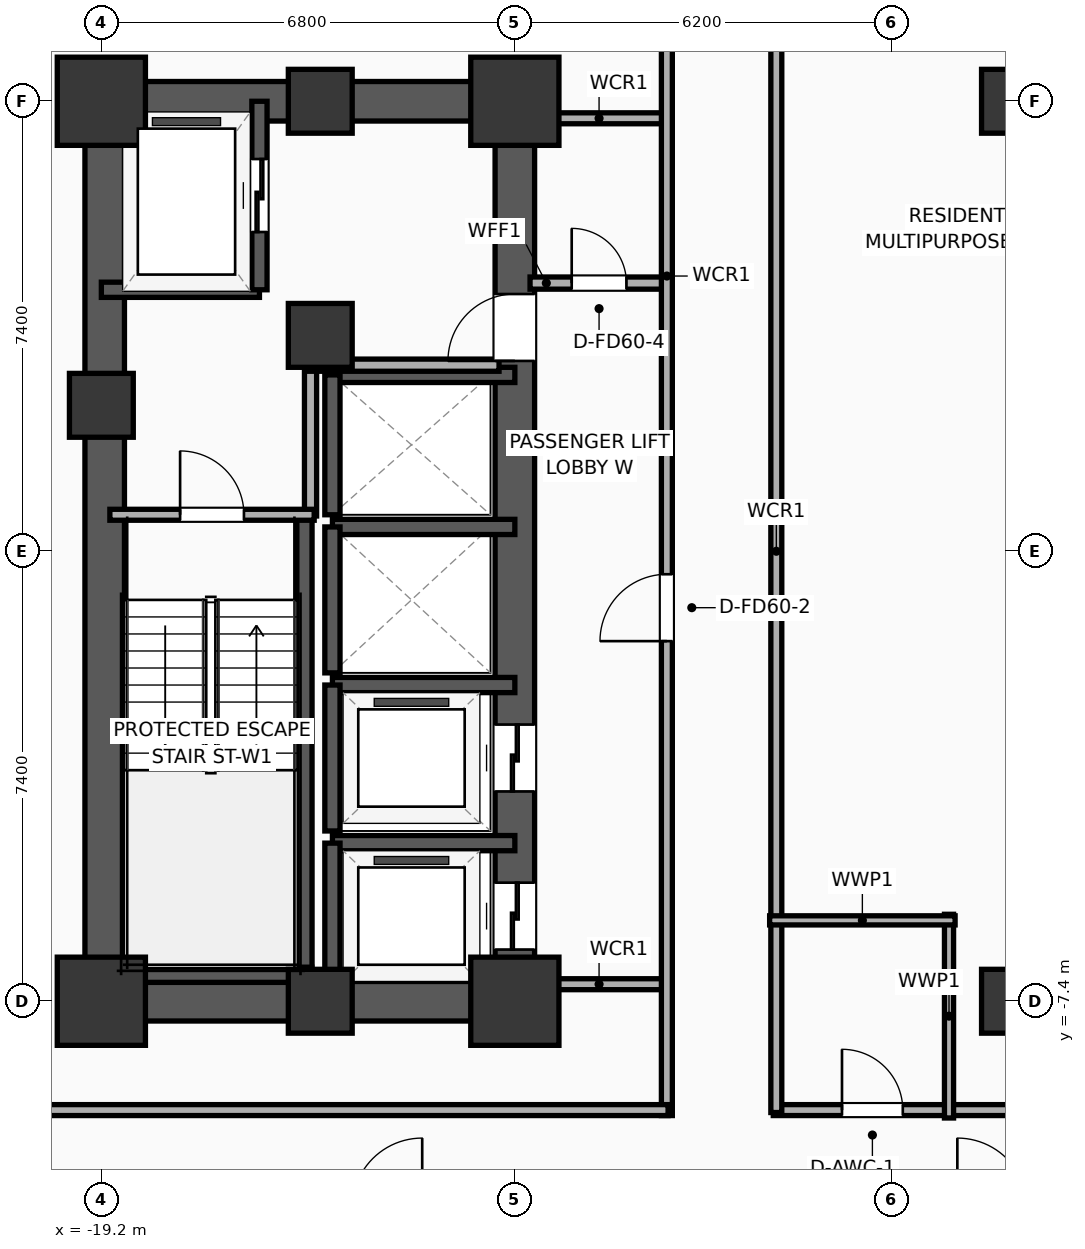
"""IFC4 building model, lengths in metres.
Left out: names, types, materials, properties, quantities, classifications, styles, units other than length and angle.
Written with IfcOpenShell. Run it as: python <this file> out.ifc"""

import sys

from ifc_helpers import new_model, si_unit, direction, frame, frame_2d, origin, origin_2d, place, context, subcontext, project, spatial, rectangle, extrude, element, fill, save


model = new_model("IFC4")
c1 = context("Model", 3, precision=1e-05, world=origin(), true_north=direction((0.0, 1.0)))
c2 = subcontext(c1, "Body", "Model", "MODEL_VIEW")
j1 = project(units=[si_unit("LENGTHUNIT", "METRE"), si_unit("PLANEANGLEUNIT", "RADIAN")], contexts=[c1])
p1 = place(None, origin())
s1 = spatial("IfcSite", under=j1, at=p1, CompositionType="ELEMENT")
p2 = place(p1, origin())
s2 = spatial("IfcBuilding", under=s1, at=p2, CompositionType="ELEMENT")
p3 = place(p2, frame((0.0, 0.0, 53.3)))
s3 = spatial("IfcBuildingStorey", under=s2, at=p3, CompositionType="ELEMENT", Elevation=53.3)
p4 = place(p3, frame((-19.2, -7.4, 0.0), z_axis=(0.0, 0.0, 1.0), x_axis=(1.0, 0.0, 0.0)))
e1 = element("IfcColumn", 1, at=p4, inside=s3, PredefinedType="COLUMN", context=c2, shape_type="SweptSolid", body=[
    extrude(rectangle(XDim=1.45, YDim=1.45, at=origin_2d()), origin(), (0.0, 0.0, 1.0), 3.9),
])
p5 = place(p3, frame((-19.2, 2.4, 0.0), z_axis=(0.0, 0.0, 1.0), x_axis=(1.0, 0.0, 0.0)))
e2 = element("IfcColumn", 2, at=p5, inside=s3, PredefinedType="COLUMN", context=c2, shape_type="SweptSolid", body=[
    extrude(rectangle(XDim=1.05, YDim=1.05, at=origin_2d()), origin(), (0.0, 0.0, 1.0), 3.9),
])
p6 = place(p3, frame((-19.2, 7.4, 0.0), z_axis=(0.0, 0.0, 1.0), x_axis=(1.0, 0.0, 0.0)))
e3 = element("IfcColumn", 3, at=p6, inside=s3, PredefinedType="COLUMN", context=c2, shape_type="SweptSolid", body=[
    extrude(rectangle(XDim=1.45, YDim=1.45, at=origin_2d()), origin(), (0.0, 0.0, 1.0), 3.9),
])
for number, where, z_axis, x_axis in (
    (4, (-15.6, -7.4, 0.0), (0.0, 0.0, 1.0), (1.0, 0.0, 0.0)),
    (5, (-15.6, 7.4, 0.0), (0.0, 0.0, 1.0), (1.0, 0.0, 0.0)),
):
    element("IfcColumn", number, at=place(p3, frame(where, z_axis=z_axis, x_axis=x_axis)), inside=s3, PredefinedType="COLUMN", context=c2, shape_type="SweptSolid", body=[
        extrude(rectangle(XDim=1.05, YDim=1.05, at=origin_2d()), origin(), (0.0, 0.0, 1.0), 3.9),
    ])
p7 = place(p3, frame((-12.4, -7.4, 0.0), z_axis=(0.0, 0.0, 1.0), x_axis=(1.0, 0.0, 0.0)))
e6 = element("IfcColumn", 6, at=p7, inside=s3, PredefinedType="COLUMN", context=c2, shape_type="SweptSolid", body=[
    extrude(rectangle(XDim=1.45, YDim=1.45, at=origin_2d()), origin(), (0.0, 0.0, 1.0), 3.9),
])
p8 = place(p3, frame((-15.6, 3.55, 0.0), z_axis=(0.0, 0.0, 1.0), x_axis=(1.0, 0.0, 0.0)))
e7 = element("IfcColumn", 7, at=p8, inside=s3, PredefinedType="COLUMN", context=c2, shape_type="SweptSolid", body=[
    extrude(rectangle(XDim=1.05, YDim=1.05, at=origin_2d()), origin(), (0.0, 0.0, 1.0), 3.9),
])
p9 = place(p3, frame((-12.4, 7.4, 0.0), z_axis=(0.0, 0.0, 1.0), x_axis=(1.0, 0.0, 0.0)))
e8 = element("IfcColumn", 8, at=p9, inside=s3, PredefinedType="COLUMN", context=c2, shape_type="SweptSolid", body=[
    extrude(rectangle(XDim=1.45, YDim=1.45, at=origin_2d()), origin(), (0.0, 0.0, 1.0), 3.9),
])
for number, where, z_axis, x_axis in (
    (9, (-19.525, -7.4, 0.0), (0.0, 0.0, 1.0), (1.0, 0.0, 0.0)),
    (10, (-19.525, 7.4, 0.0), (0.0, 0.0, 1.0), (1.0, 0.0, 0.0)),
):
    element("IfcWall", number, at=place(p3, frame(where, z_axis=z_axis, x_axis=x_axis)), inside=s3, PredefinedType="SHEAR", context=c2, shape_type="SweptSolid", body=[
        extrude(rectangle(XDim=7.45, YDim=0.65, at=frame_2d((3.725, 0.0))), origin(), (0.0, 0.0, 1.0), 3.65),
    ])
p10 = place(p3, frame((-19.145, -7.4, 0.0), z_axis=(0.0, 0.0, 1.0), x_axis=(0.0, 1.0, 0.0)))
e11 = element("IfcWall", 11, at=p10, inside=s3, PredefinedType="SHEAR", context=c2, shape_type="SweptSolid", body=[
    extrude(rectangle(XDim=14.8, YDim=0.65, at=frame_2d((7.4, 0.0))), origin(), (0.0, 0.0, 1.0), 3.65),
])
p11 = place(p3, frame((-12.4, -7.4, 0.0), z_axis=(0.0, 0.0, 1.0), x_axis=(0.0, 1.0, 0.0)))
e12 = element("IfcWall", 12, at=p11, inside=s3, PredefinedType="SHEAR", context=c2, shape_type="SweptSolid", body=[
    extrude(rectangle(XDim=14.8, YDim=0.65, at=frame_2d((7.4, 0.0))), origin(), (0.0, 0.0, 1.0), 3.65),
])
p12 = place(p11, frame((0.85, 0.0, 0.0)))
e13 = element("IfcOpeningElement", 13, at=p12, cuts=e12, PredefinedType="OPENING", context=c2, shape_type="SweptSolid", body=[
    extrude(rectangle(XDim=1.1, YDim=2.05, at=frame_2d((0.55, 1.025))), frame((0.0, 0.335, 0.0), z_axis=(0.0, -1.0, 0.0), x_axis=(1.0, 0.0, 0.0)), (0.0, 0.0, 1.0), 0.67),
])
p13 = place(p11, frame((3.45, 0.0, 0.0)))
e14 = element("IfcOpeningElement", 14, at=p13, cuts=e12, PredefinedType="OPENING", context=c2, shape_type="SweptSolid", body=[
    extrude(rectangle(XDim=1.1, YDim=2.05, at=frame_2d((0.55, 1.025))), frame((0.0, 0.335, 0.0), z_axis=(0.0, -1.0, 0.0), x_axis=(1.0, 0.0, 0.0)), (0.0, 0.0, 1.0), 0.67),
])
p14 = place(p11, frame((10.53, 0.0, 0.0)))
e15 = element("IfcOpeningElement", 15, at=p14, cuts=e12, PredefinedType="OPENING", context=c2, shape_type="SweptSolid", body=[
    extrude(rectangle(XDim=1.1, YDim=2.05, at=frame_2d((0.55, 1.025))), frame((0.0, 0.335, 0.0), z_axis=(0.0, -1.0, 0.0), x_axis=(1.0, 0.0, 0.0)), (0.0, 0.0, 1.0), 0.67),
])
p15 = place(p3, frame((-15.86, -7.085, 0.0), z_axis=(0.0, 0.0, 1.0), x_axis=(0.0, 1.0, 0.0)))
e16 = element("IfcWall", 16, at=p15, inside=s3, PredefinedType="SOLIDWALL", context=c2, shape_type="SweptSolid", body=[
    extrude(rectangle(XDim=7.685, YDim=0.25, at=frame_2d((3.843, 0.0))), origin(), (0.0, 0.0, 1.0), 3.65),
])
p16 = place(p3, frame((-19.2, -6.965, 0.0), z_axis=(0.0, 0.0, 1.0), x_axis=(1.0, 0.0, 0.0)))
e17 = element("IfcWall", 17, at=p16, inside=s3, PredefinedType="SOLIDWALL", context=c2, shape_type="SweptSolid", body=[
    extrude(rectangle(XDim=3.46, YDim=0.25, at=frame_2d((1.73, 0.0))), origin(), (0.0, 0.0, 1.0), 3.65),
])
for number, where, z_axis, x_axis in (
    (18, (-4.2, -7.4, 0.0), (0.0, 0.0, 1.0), (1.0, 0.0, 0.0)),
    (19, (-4.2, 7.4, 0.0), (0.0, 0.0, 1.0), (1.0, 0.0, 0.0)),
):
    element("IfcColumn", number, at=place(p3, frame(where, z_axis=z_axis, x_axis=x_axis)), inside=s3, PredefinedType="COLUMN", context=c2, shape_type="SweptSolid", body=[
        extrude(rectangle(XDim=1.05, YDim=1.05, at=origin_2d()), origin(), (0.0, 0.0, 1.0), 3.9),
    ])
p17 = place(p3, frame((-19.2, 4.3, 0.0), z_axis=(0.0, 0.0, 1.0), x_axis=(1.0, 0.0, 0.0)))
e20 = element("IfcWall", 20, at=p17, inside=s3, PredefinedType="SOLIDWALL", context=c2, shape_type="SweptSolid", body=[
    extrude(rectangle(XDim=2.6, YDim=0.25, at=frame_2d((1.3, 0.0))), origin(), (0.0, 0.0, 1.0), 3.65),
])
p18 = place(p3, frame((-16.6, 4.3, 0.0), z_axis=(0.0, 0.0, 1.0), x_axis=(0.0, 1.0, 0.0)))
e21 = element("IfcWall", 21, at=p18, inside=s3, PredefinedType="SOLIDWALL", context=c2, shape_type="SweptSolid", body=[
    extrude(rectangle(XDim=3.1, YDim=0.25, at=frame_2d((1.55, 0.0))), origin(), (0.0, 0.0, 1.0), 3.65),
])
p19 = place(p18, frame((0.95, 0.0, 0.0)))
e22 = element("IfcOpeningElement", 22, at=p19, cuts=e21, PredefinedType="OPENING", context=c2, shape_type="SweptSolid", body=[
    extrude(rectangle(XDim=1.2, YDim=2.05, at=frame_2d((0.6, 1.025))), frame((0.0, 0.135, 0.0), z_axis=(0.0, -1.0, 0.0), x_axis=(1.0, 0.0, 0.0)), (0.0, 0.0, 1.0), 0.27),
])
p20 = place(p3, frame((-12.4, -4.8, 0.0), z_axis=(0.0, 0.0, 1.0), x_axis=(-1.0, 0.0, 0.0)))
e23 = element("IfcWall", 23, at=p20, inside=s3, PredefinedType="SOLIDWALL", context=c2, shape_type="SweptSolid", body=[
    extrude(rectangle(XDim=3.0, YDim=0.25, at=frame_2d((1.5, 0.0))), origin(), (0.0, 0.0, 1.0), 3.65),
])
p21 = place(p3, frame((-15.4, -4.8, 0.0), z_axis=(0.0, 0.0, 1.0), x_axis=(0.0, -1.0, 0.0)))
e24 = element("IfcWall", 24, at=p21, inside=s3, PredefinedType="SOLIDWALL", context=c2, shape_type="SweptSolid", body=[
    extrude(rectangle(XDim=2.6, YDim=0.25, at=frame_2d((1.3, 0.0))), origin(), (0.0, 0.0, 1.0), 3.65),
])
p22 = place(p3, frame((-12.4, -2.2, 0.0), z_axis=(0.0, 0.0, 1.0), x_axis=(-1.0, 0.0, 0.0)))
e25 = element("IfcWall", 25, at=p22, inside=s3, PredefinedType="SOLIDWALL", context=c2, shape_type="SweptSolid", body=[
    extrude(rectangle(XDim=3.0, YDim=0.25, at=frame_2d((1.5, 0.0))), origin(), (0.0, 0.0, 1.0), 3.65),
])
p23 = place(p3, frame((-15.4, -2.2, 0.0), z_axis=(0.0, 0.0, 1.0), x_axis=(0.0, -1.0, 0.0)))
e26 = element("IfcWall", 26, at=p23, inside=s3, PredefinedType="SOLIDWALL", context=c2, shape_type="SweptSolid", body=[
    extrude(rectangle(XDim=2.4, YDim=0.25, at=frame_2d((1.2, 0.0))), origin(), (0.0, 0.0, 1.0), 3.65),
])
p24 = place(p3, frame((-12.4, 0.4, 0.0), z_axis=(0.0, 0.0, 1.0), x_axis=(-1.0, 0.0, 0.0)))
e27 = element("IfcWall", 27, at=p24, inside=s3, PredefinedType="SOLIDWALL", context=c2, shape_type="SweptSolid", body=[
    extrude(rectangle(XDim=3.0, YDim=0.25, at=frame_2d((1.5, 0.0))), origin(), (0.0, 0.0, 1.0), 3.65),
])
p25 = place(p3, frame((-15.4, 0.4, 0.0), z_axis=(0.0, 0.0, 1.0), x_axis=(0.0, -1.0, 0.0)))
e28 = element("IfcWall", 28, at=p25, inside=s3, PredefinedType="SOLIDWALL", context=c2, shape_type="SweptSolid", body=[
    extrude(rectangle(XDim=2.4, YDim=0.25, at=frame_2d((1.2, 0.0))), origin(), (0.0, 0.0, 1.0), 3.65),
])
p26 = place(p3, frame((-12.4, 2.9, 0.0), z_axis=(0.0, 0.0, 1.0), x_axis=(-1.0, 0.0, 0.0)))
e29 = element("IfcWall", 29, at=p26, inside=s3, PredefinedType="SOLIDWALL", context=c2, shape_type="SweptSolid", body=[
    extrude(rectangle(XDim=3.0, YDim=0.25, at=frame_2d((1.5, 0.0))), origin(), (0.0, 0.0, 1.0), 3.65),
])
p27 = place(p3, frame((-15.4, 2.9, 0.0), z_axis=(0.0, 0.0, 1.0), x_axis=(0.0, -1.0, 0.0)))
e30 = element("IfcWall", 30, at=p27, inside=s3, PredefinedType="SOLIDWALL", context=c2, shape_type="SweptSolid", body=[
    extrude(rectangle(XDim=2.3, YDim=0.25, at=frame_2d((1.15, 0.0))), origin(), (0.0, 0.0, 1.0), 3.65),
])
p28 = place(p3, frame((-15.76, 0.58, 0.0), z_axis=(0.0, 0.0, 1.0), x_axis=(0.0, 1.0, 0.0)))
e31 = element("IfcWall", 31, at=p28, inside=s3, PredefinedType="PARTITIONING", context=c2, shape_type="SweptSolid", body=[
    extrude(rectangle(XDim=2.52, YDim=0.2, at=frame_2d((1.26, 0.0))), origin(), (0.0, 0.0, 1.0), 3.65),
])
p29 = place(p3, frame((-15.82, 3.06, 0.0), z_axis=(0.0, 0.0, 1.0), x_axis=(1.0, 0.0, 0.0)))
e32 = element("IfcWall", 32, at=p29, inside=s3, PredefinedType="PARTITIONING", context=c2, shape_type="SweptSolid", body=[
    extrude(rectangle(XDim=3.16, YDim=0.2, at=frame_2d((1.58, 0.0))), origin(), (0.0, 0.0, 1.0), 3.65),
])
p30 = place(p3, frame((-19.06, 0.6, 0.0), z_axis=(0.0, 0.0, 1.0), x_axis=(1.0, 0.0, 0.0)))
e33 = element("IfcWall", 33, at=p30, inside=s3, PredefinedType="PARTITIONING", context=c2, shape_type="SweptSolid", body=[
    extrude(rectangle(XDim=3.36, YDim=0.18, at=frame_2d((1.68, 0.0))), origin(), (0.0, 0.0, 1.0), 3.65),
])
p31 = place(p30, frame((1.155, 0.0, 0.0)))
e34 = element("IfcOpeningElement", 34, at=p31, cuts=e33, PredefinedType="OPENING", context=c2, shape_type="SweptSolid", body=[
    extrude(rectangle(XDim=1.05, YDim=2.05, at=frame_2d((0.525, 1.025))), frame((0.0, 0.1, 0.0), z_axis=(0.0, -1.0, 0.0), x_axis=(1.0, 0.0, 0.0)), (0.0, 0.0, 1.0), 0.2),
])
p32 = place(p3, frame((-12.15, 4.41, 0.0), z_axis=(0.0, 0.0, 1.0), x_axis=(1.0, 0.0, 0.0)))
e35 = element("IfcWall", 35, at=p32, inside=s3, PredefinedType="PARTITIONING", context=c2, shape_type="SweptSolid", body=[
    extrude(rectangle(XDim=2.27, YDim=0.2, at=frame_2d((1.135, 0.0))), origin(), (0.0, 0.0, 1.0), 3.65),
])
p33 = place(p32, frame((0.685, 0.0, 0.0)))
e36 = element("IfcOpeningElement", 36, at=p33, cuts=e35, PredefinedType="OPENING", context=c2, shape_type="SweptSolid", body=[
    extrude(rectangle(XDim=0.9, YDim=2.05, at=frame_2d((0.45, 1.025))), frame((0.0, 0.11, 0.0), z_axis=(0.0, -1.0, 0.0), x_axis=(1.0, 0.0, 0.0)), (0.0, 0.0, 1.0), 0.22),
])
for number, where, z_axis, x_axis in (
    (37, (-12.15, 7.12, 0.0), (0.0, 0.0, 1.0), (1.0, 0.0, 0.0)),
    (38, (-12.15, -7.12, 0.0), (0.0, 0.0, 1.0), (1.0, 0.0, 0.0)),
):
    element("IfcWall", number, at=place(p3, frame(where, z_axis=z_axis, x_axis=x_axis)), inside=s3, PredefinedType="PARTITIONING", context=c2, shape_type="SweptSolid", body=[
        extrude(rectangle(XDim=2.27, YDim=0.18, at=frame_2d((1.135, 0.0))), origin(), (0.0, 0.0, 1.0), 2.94),
    ])
p34 = place(p3, frame((-9.9, -9.28, 0.0), z_axis=(0.0, 0.0, 1.0), x_axis=(0.0, 1.0, 0.0)))
e39 = element("IfcWall", 39, at=p34, inside=s3, PredefinedType="PARTITIONING", context=c2, shape_type="SweptSolid", body=[
    extrude(rectangle(XDim=18.56, YDim=0.18, at=frame_2d((9.28, 0.0))), origin(), (0.0, 0.0, 1.0), 3.65),
])
p35 = place(p34, frame((7.802, 0.0, 0.0)))
e40 = element("IfcOpeningElement", 40, at=p35, cuts=e39, PredefinedType="OPENING", context=c2, shape_type="SweptSolid", body=[
    extrude(rectangle(XDim=1.1, YDim=2.05, at=frame_2d((0.55, 1.025))), frame((0.0, 0.1, 0.0), z_axis=(0.0, -1.0, 0.0), x_axis=(1.0, 0.0, 0.0)), (0.0, 0.0, 1.0), 0.2),
])
p36 = place(p3, frame((-33.41, -9.19, 0.0), z_axis=(0.0, 0.0, 1.0), x_axis=(1.0, 0.0, 0.0)))
e41 = element("IfcWall", 41, at=p36, inside=s3, PredefinedType="PARTITIONING", context=c2, shape_type="SweptSolid", body=[
    extrude(rectangle(XDim=23.53, YDim=0.18, at=frame_2d((11.765, 0.0))), origin(), (0.0, 0.0, 1.0), 3.65),
])
p37 = place(p3, frame((-8.15, -9.19, 0.0), z_axis=(0.0, 0.0, 1.0), x_axis=(1.0, 0.0, 0.0)))
e42 = element("IfcWall", 42, at=p37, inside=s3, PredefinedType="PARTITIONING", context=c2, shape_type="SweptSolid", body=[
    extrude(rectangle(XDim=16.3, YDim=0.18, at=frame_2d((8.15, 0.0))), origin(), (0.0, 0.0, 1.0), 3.65),
])
p38 = place(p37, frame((1.13, 0.0, 0.0)))
e43 = element("IfcOpeningElement", 43, at=p38, cuts=e42, PredefinedType="OPENING", context=c2, shape_type="SweptSolid", body=[
    extrude(rectangle(XDim=1.0, YDim=2.05, at=frame_2d((0.5, 1.025))), frame((0.0, 0.1, 0.0), z_axis=(0.0, -1.0, 0.0), x_axis=(1.0, 0.0, 0.0)), (0.0, 0.0, 1.0), 0.2),
])
p39 = place(p37, frame((10.12, 0.0, 0.0)))
e44 = element("IfcOpeningElement", 44, at=p39, cuts=e42, PredefinedType="OPENING", context=c2, shape_type="SweptSolid", body=[
    extrude(rectangle(XDim=0.95, YDim=2.05, at=frame_2d((0.475, 1.025))), frame((0.0, 0.1, 0.0), z_axis=(0.0, -1.0, 0.0), x_axis=(1.0, 0.0, 0.0)), (0.0, 0.0, 1.0), 0.2),
])
p40 = place(p3, frame((-8.1, -9.23, 0.0), z_axis=(0.0, 0.0, 1.0), x_axis=(0.0, 1.0, 0.0)))
e45 = element("IfcWall", 45, at=p40, inside=s3, PredefinedType="PARTITIONING", context=c2, shape_type="SweptSolid", body=[
    extrude(rectangle(XDim=18.46, YDim=0.18, at=frame_2d((9.23, 0.0))), origin(), (0.0, 0.0, 1.0), 3.65),
])
p41 = place(p3, frame((-5.26, -9.32, 0.0), z_axis=(0.0, 0.0, 1.0), x_axis=(0.0, 1.0, 0.0)))
e46 = element("IfcWall", 46, at=p41, inside=s3, PredefinedType="PLUMBINGWALL", context=c2, shape_type="SweptSolid", body=[
    extrude(rectangle(XDim=3.35, YDim=0.15, at=frame_2d((1.675, 0.0))), origin(), (0.0, 0.0, 1.0), 3.65),
])
p42 = place(p3, frame((-8.21, -6.07, 0.0), z_axis=(0.0, 0.0, 1.0), x_axis=(1.0, 0.0, 0.0)))
e47 = element("IfcWall", 47, at=p42, inside=s3, PredefinedType="PLUMBINGWALL", context=c2, shape_type="SweptSolid", body=[
    extrude(rectangle(XDim=3.05, YDim=0.15, at=frame_2d((1.525, 0.0))), origin(), (0.0, 0.0, 1.0), 3.65),
])
p43 = place(p19, origin())
e48 = element("IfcDoor", 48, at=p43, inside=s3, OperationType="SLIDING_TO_LEFT", PredefinedType="DOOR", context=c2, shape_type="SweptSolid", body=[
    extrude(rectangle(XDim=1.2, YDim=2.05, at=frame_2d((0.6, 1.025))), frame((0.0, 0.025, 0.0), z_axis=(0.0, -1.0, 0.0), x_axis=(1.0, 0.0, 0.0)), (0.0, 0.0, 1.0), 0.05),
])
fill(e22, e48)
p44 = place(p12, origin())
e49 = element("IfcDoor", 49, at=p44, inside=s3, OperationType="SLIDING_TO_LEFT", PredefinedType="DOOR", context=c2, shape_type="SweptSolid", body=[
    extrude(rectangle(XDim=1.1, YDim=2.05, at=frame_2d((0.55, 1.025))), frame((0.0, 0.025, 0.0), z_axis=(0.0, -1.0, 0.0), x_axis=(1.0, 0.0, 0.0)), (0.0, 0.0, 1.0), 0.05),
])
fill(e13, e49)
p45 = place(p13, origin())
e50 = element("IfcDoor", 50, at=p45, inside=s3, OperationType="SLIDING_TO_LEFT", PredefinedType="DOOR", context=c2, shape_type="SweptSolid", body=[
    extrude(rectangle(XDim=1.1, YDim=2.05, at=frame_2d((0.55, 1.025))), frame((0.0, 0.025, 0.0), z_axis=(0.0, -1.0, 0.0), x_axis=(1.0, 0.0, 0.0)), (0.0, 0.0, 1.0), 0.05),
])
fill(e14, e50)
p46 = place(p31, origin())
e51 = element("IfcDoor", 51, at=p46, inside=s3, OperationType="SINGLE_SWING_LEFT", PredefinedType="DOOR", context=c2, shape_type="SweptSolid", body=[
    extrude(rectangle(XDim=1.05, YDim=2.05, at=frame_2d((0.525, 1.025))), frame((0.0, 0.025, 0.0), z_axis=(0.0, -1.0, 0.0), x_axis=(1.0, 0.0, 0.0)), (0.0, 0.0, 1.0), 0.05),
])
fill(e34, e51)
p47 = place(p33, origin())
e52 = element("IfcDoor", 52, at=p47, inside=s3, OperationType="SINGLE_SWING_LEFT", PredefinedType="DOOR", context=c2, shape_type="SweptSolid", body=[
    extrude(rectangle(XDim=0.9, YDim=2.05, at=frame_2d((0.45, 1.025))), frame((0.0, 0.025, 0.0), z_axis=(0.0, -1.0, 0.0), x_axis=(1.0, 0.0, 0.0)), (0.0, 0.0, 1.0), 0.05),
])
fill(e36, e52)
p48 = place(p35, origin())
e53 = element("IfcDoor", 53, at=p48, inside=s3, OperationType="SINGLE_SWING_LEFT", PredefinedType="DOOR", context=c2, shape_type="SweptSolid", body=[
    extrude(rectangle(XDim=1.1, YDim=2.05, at=frame_2d((0.55, 1.025))), frame((0.0, 0.025, 0.0), z_axis=(0.0, -1.0, 0.0), x_axis=(1.0, 0.0, 0.0)), (0.0, 0.0, 1.0), 0.05),
])
fill(e40, e53)
p49 = place(p38, origin())
e54 = element("IfcDoor", 54, at=p49, inside=s3, OperationType="SINGLE_SWING_LEFT", PredefinedType="DOOR", context=c2, shape_type="SweptSolid", body=[
    extrude(rectangle(XDim=1.0, YDim=2.05, at=frame_2d((0.5, 1.025))), frame((0.0, 0.025, 0.0), z_axis=(0.0, -1.0, 0.0), x_axis=(1.0, 0.0, 0.0)), (0.0, 0.0, 1.0), 0.05),
])
fill(e43, e54)
p50 = place(p14, origin())
e55 = element("IfcDoor", 55, at=p50, inside=s3, OperationType="SINGLE_SWING_LEFT", PredefinedType="DOOR", context=c2, shape_type="SweptSolid", body=[
    extrude(rectangle(XDim=1.1, YDim=2.05, at=frame_2d((0.55, 1.025))), frame((0.0, 0.025, 0.0), z_axis=(0.0, -1.0, 0.0), x_axis=(1.0, 0.0, 0.0)), (0.0, 0.0, 1.0), 0.05),
])
fill(e15, e55)
save(model, sys.argv[1])
